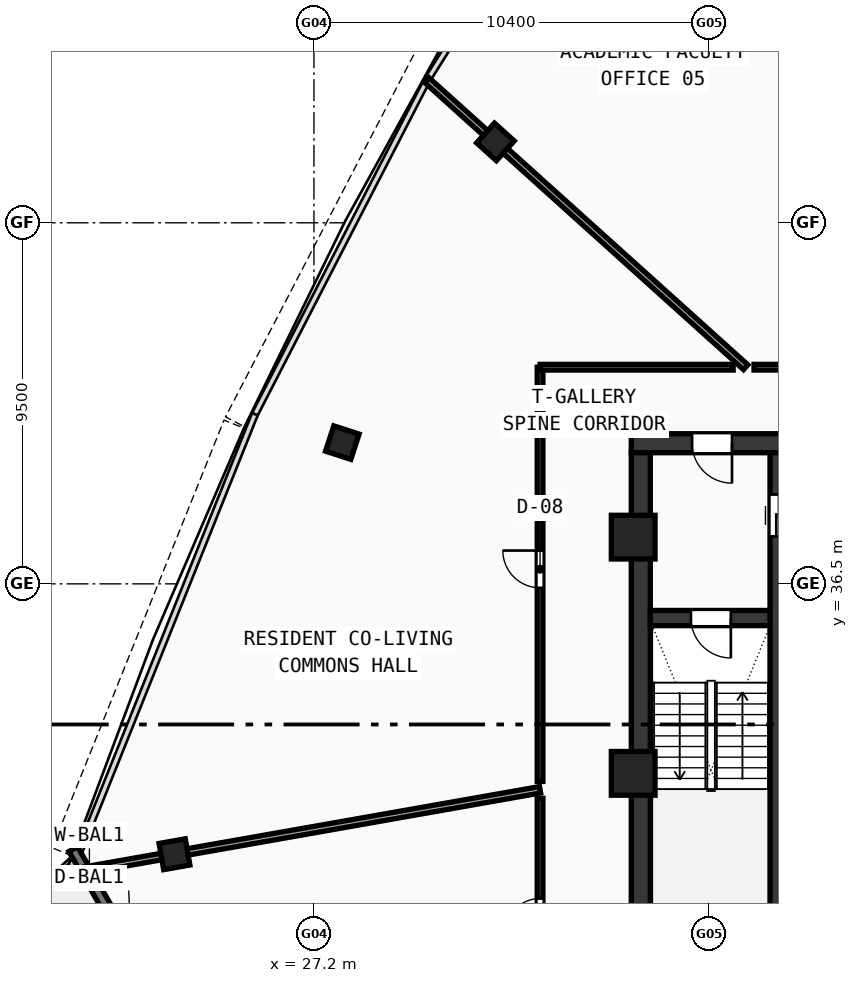
"""IFC4 building model, lengths in metres.
Left out: names, types, materials, properties, quantities, classifications, styles, units other than length and angle.
Written with IfcOpenShell. Run it as: python <this file> out.ifc"""

import sys

from ifc_helpers import new_model, si_unit, direction, frame, frame_2d, origin, origin_with_axes, origin_2d, place, context, subcontext, project, spatial, rectangle, hollow_rectangle, extrude, source, transform, mapped, element, fill, save


model = new_model("IFC4")
c1 = context("Model", 3, precision=1e-05, world=origin(), true_north=direction((0.0, 1.0)))
c2 = subcontext(c1, "Body", "Model", "MODEL_VIEW")
j1 = project(units=[si_unit("LENGTHUNIT", "METRE"), si_unit("PLANEANGLEUNIT", "RADIAN")], contexts=[c1])
p1 = place(None, origin())
s1 = spatial("IfcSite", under=j1, at=p1, CompositionType="ELEMENT")
p2 = place(p1, origin())
s2 = spatial("IfcBuilding", under=s1, at=p2, CompositionType="ELEMENT")
p3 = place(p2, frame((0.0, 0.0, 348.01)))
s3 = spatial("IfcBuildingStorey", under=s2, at=p3, CompositionType="ELEMENT", Elevation=348.01)
p4 = place(p3, frame((35.55, 40.2, 0.0), z_axis=(0.0, 0.0, 1.0), x_axis=(1.0, 0.0, 0.0)))
e1 = element("IfcWall", 1, at=p4, inside=s3, PredefinedType="SHEAR", context=c2, shape_type="SweptSolid", body=[
    extrude(rectangle(XDim=11.25, YDim=0.5, at=frame_2d((5.625, 0.0))), origin(), (0.0, 0.0, 1.0), 3.49),
])
p5 = place(p4, frame((1.6, 0.0, 0.0)))
e2 = element("IfcOpeningElement", 2, at=p5, cuts=e1, PredefinedType="OPENING", context=c2, shape_type="SweptSolid", body=[
    extrude(rectangle(XDim=1.05, YDim=2.1, at=frame_2d((0.525, 1.05))), frame((0.0, 0.26, 0.0), z_axis=(0.0, -1.0, 0.0), x_axis=(1.0, 0.0, 0.0)), (0.0, 0.0, 1.0), 0.52),
])
p6 = place(p3, frame((35.8, 27.75, 0.0), z_axis=(0.0, 0.0, 1.0), x_axis=(0.0, 1.0, 0.0)))
e3 = element("IfcWall", 3, at=p6, inside=s3, PredefinedType="SHEAR", context=c2, shape_type="SweptSolid", body=[
    extrude(rectangle(XDim=12.2, YDim=0.5, at=frame_2d((6.1, 0.0))), origin(), (0.0, 0.0, 1.0), 3.49),
])
p7 = place(p3, frame((39.4, 27.75, 0.0), z_axis=(0.0, 0.0, 1.0), x_axis=(0.0, 1.0, 0.0)))
e4 = element("IfcWall", 4, at=p7, inside=s3, PredefinedType="SHEAR", context=c2, shape_type="SweptSolid", body=[
    extrude(rectangle(XDim=12.2, YDim=0.4, at=frame_2d((6.1, 0.0))), origin(), (0.0, 0.0, 1.0), 3.49),
])
p8 = place(p7, frame((10.0, 0.0, 0.0)))
e5 = element("IfcOpeningElement", 5, at=p8, cuts=e4, PredefinedType="OPENING", context=c2, shape_type="SweptSolid", body=[
    extrude(rectangle(XDim=1.1, YDim=2.1, at=frame_2d((0.55, 1.05))), frame((0.0, 0.21, 0.0), z_axis=(0.0, -1.0, 0.0), x_axis=(1.0, 0.0, 0.0)), (0.0, 0.0, 1.0), 0.42),
])
p9 = place(p3, frame((36.05, 35.6, 0.0), z_axis=(0.0, 0.0, 1.0), x_axis=(1.0, 0.0, 0.0)))
e6 = element("IfcWall", 6, at=p9, inside=s3, PredefinedType="SHEAR", context=c2, shape_type="SweptSolid", body=[
    extrude(rectangle(XDim=3.15, YDim=0.4, at=frame_2d((1.575, 0.0))), origin(), (0.0, 0.0, 1.0), 3.49),
])
p10 = place(p9, frame((1.07, 0.0, 0.0)))
e7 = element("IfcOpeningElement", 7, at=p10, cuts=e6, PredefinedType="OPENING", context=c2, shape_type="SweptSolid", body=[
    extrude(rectangle(XDim=1.05, YDim=2.1, at=frame_2d((0.525, 1.05))), frame((0.0, 0.21, 0.0), z_axis=(0.0, -1.0, 0.0), x_axis=(1.0, 0.0, 0.0)), (0.0, 0.0, 1.0), 0.42),
])
m1 = source(origin(), c2, "Body", "SweptSolid", [
    extrude(hollow_rectangle(XDim=1.15, YDim=1.15, WallThickness=0.048, at=origin_2d()), origin(), (0.0, 0.0, 1.0), 3.75),
])
for number, where, z_axis, x_axis in (
    (8, (35.6, 37.729, -0.26), (0.0, 0.0, 1.0), (1.0, 0.0, 0.0)),
    (9, (35.6, 31.513, -0.26), (0.0, 0.0, 1.0), (1.0, 0.0, 0.0)),
):
    element("IfcColumn", number, at=place(p3, frame(where, z_axis=z_axis, x_axis=x_axis)), inside=s3, PredefinedType="COLUMN", context=c2, shape_type="MappedRepresentation", body=[
        mapped(m1, transform((0.0, 0.0, 0.0), scale=1.0)),
    ])
m2 = source(origin(), c2, "Body", "SweptSolid", [
    extrude(hollow_rectangle(XDim=0.7, YDim=0.7, WallThickness=0.026, at=origin_2d()), origin(), (0.0, 0.0, 1.0), 3.75),
])
for number, where, z_axis, x_axis in (
    (10, (31.975, 48.129, -0.26), (0.0, 0.0, 1.0), (-0.669, -0.743, 0.0)),
    (11, (27.947, 40.216, -0.26), (0.0, 0.0, 1.0), (-0.309, -0.951, 0.0)),
    (12, (23.53, 29.385, -0.26), (0.0, 0.0, 1.0), (0.174, -0.985, 0.0)),
):
    element("IfcColumn", number, at=place(p3, frame(where, z_axis=z_axis, x_axis=x_axis)), inside=s3, PredefinedType="COLUMN", context=c2, shape_type="MappedRepresentation", body=[
        mapped(m2, transform((0.0, 0.0, 0.0), scale=1.0)),
    ])
p11 = place(p3, frame((20.865, 29.521, 0.0), z_axis=(0.0, 0.0, 1.0), x_axis=(0.49795859982, -0.867200803082, 0.0)))
e13 = element("IfcWall", 13, at=p11, inside=s3, PredefinedType="STANDARD", context=c2, shape_type="SweptSolid", body=[
    extrude(rectangle(XDim=6.123, YDim=0.26, at=frame_2d((3.061, 0.0))), origin(), (0.0, 0.0, 1.0), 3.49),
])
p12 = place(p11, frame((2.161, 0.0, 0.0)))
e14 = element("IfcOpeningElement", 14, at=p12, cuts=e13, PredefinedType="OPENING", context=c2, shape_type="SweptSolid", body=[
    extrude(rectangle(XDim=1.8, YDim=2.15, at=frame_2d((0.9, 1.075))), frame((0.0, 0.14, 0.0), z_axis=(0.0, -1.0, 0.0), x_axis=(1.0, 0.0, 0.0)), (0.0, 0.0, 1.0), 0.28),
])
p13 = place(p3, frame((42.702, 45.6, 0.0), z_axis=(0.0, 0.0, 1.0), x_axis=(-0.40675369263, 0.913537866501, 0.0)))
e15 = element("IfcWall", 15, at=p13, inside=s3, PredefinedType="PARTITIONING", context=c2, shape_type="SweptSolid", body=[
    extrude(rectangle(XDim=15.425, YDim=0.17, at=frame_2d((7.712, 0.0))), origin(), (0.0, 0.0, 1.0), 2.89),
])
p14 = place(p3, frame((38.56, 42.2, 0.0), z_axis=(0.0, 0.0, 1.0), x_axis=(-0.74314133574, 0.669134482085, 0.0)))
e16 = element("IfcWall", 16, at=p14, inside=s3, PredefinedType="PARTITIONING", context=c2, shape_type="SweptSolid", body=[
    extrude(rectangle(XDim=11.282, YDim=0.17, at=frame_2d((5.641, 0.0))), origin(), (0.0, 0.0, 1.0), 2.89),
])
p15 = place(p3, frame((33.15, 31.082, 0.0), z_axis=(0.0, 0.0, 1.0), x_axis=(-0.984808019511, -0.173646666272, 0.0)))
e17 = element("IfcWall", 17, at=p15, inside=s3, PredefinedType="PARTITIONING", context=c2, shape_type="SweptSolid", body=[
    extrude(rectangle(XDim=12.153, YDim=0.17, at=frame_2d((6.077, 0.0))), origin(), (0.0, 0.0, 1.0), 2.89),
])
p16 = place(p3, frame((33.15, 24.9, 0.0), z_axis=(0.0, 0.0, 1.0), x_axis=(0.0, 1.0, 0.0)))
e18 = element("IfcWall", 18, at=p16, inside=s3, PredefinedType="PARTITIONING", context=c2, shape_type="SweptSolid", body=[
    extrude(rectangle(XDim=5.958, YDim=0.15, at=frame_2d((2.979, 0.0))), origin(), (0.0, 0.0, 1.0), 2.89),
])
p17 = place(p16, frame((2.401, 0.0, 0.0)))
e19 = element("IfcOpeningElement", 19, at=p17, cuts=e18, PredefinedType="OPENING", context=c2, shape_type="SweptSolid", body=[
    extrude(rectangle(XDim=0.92, YDim=2.1, at=frame_2d((0.46, 1.05))), frame((0.0, 0.085, 0.0), z_axis=(0.0, -1.0, 0.0), x_axis=(1.0, 0.0, 0.0)), (0.0, 0.0, 1.0), 0.17),
])
p18 = place(p3, frame((33.15, 31.301, 0.0), z_axis=(0.0, 0.0, 1.0), x_axis=(0.0, 1.0, 0.0)))
e20 = element("IfcWall", 20, at=p18, inside=s3, PredefinedType="PARTITIONING", context=c2, shape_type="SweptSolid", body=[
    extrude(rectangle(XDim=10.899, YDim=0.15, at=frame_2d((5.449, 0.0))), origin(), (0.0, 0.0, 1.0), 2.89),
])
p19 = place(p18, frame((5.094, 0.0, 0.0)))
e21 = element("IfcOpeningElement", 21, at=p19, cuts=e20, PredefinedType="OPENING", context=c2, shape_type="SweptSolid", body=[
    extrude(rectangle(XDim=0.98, YDim=2.12, at=frame_2d((0.49, 1.06))), frame((0.0, 0.085, 0.0), z_axis=(0.0, -1.0, 0.0), x_axis=(1.0, 0.0, 0.0)), (0.0, 0.0, 1.0), 0.17),
])
p20 = place(p3, frame((33.15, 42.2, 0.0), z_axis=(0.0, 0.0, 1.0), x_axis=(1.0, 0.0, 0.0)))
e22 = element("IfcWall", 22, at=p20, inside=s3, PredefinedType="PARTITIONING", context=c2, shape_type="SweptSolid", body=[
    extrude(rectangle(XDim=5.081, YDim=0.15, at=frame_2d((2.541, 0.0))), origin(), (0.0, 0.0, 1.0), 3.14),
])
p21 = place(p3, frame((38.78, 42.2, 0.0), z_axis=(0.0, 0.0, 1.0), x_axis=(1.0, 0.0, 0.0)))
e23 = element("IfcWall", 23, at=p21, inside=s3, PredefinedType="PARTITIONING", context=c2, shape_type="SweptSolid", body=[
    extrude(rectangle(XDim=3.2, YDim=0.15, at=frame_2d((1.6, 0.0))), origin(), (0.0, 0.0, 1.0), 2.89),
])
p22 = place(p21, frame((1.14, 0.0, 0.0)))
e24 = element("IfcOpeningElement", 24, at=p22, cuts=e23, PredefinedType="OPENING", context=c2, shape_type="SweptSolid", body=[
    extrude(rectangle(XDim=0.92, YDim=2.1, at=frame_2d((0.46, 1.05))), frame((0.0, 0.085, 0.0), z_axis=(0.0, -1.0, 0.0), x_axis=(1.0, 0.0, 0.0)), (0.0, 0.0, 1.0), 0.17),
])
m3 = source(origin(), c2, "Body", "SweptSolid", [
    extrude(rectangle(XDim=1.05, YDim=2.1, at=frame_2d((0.525, 1.05))), frame((0.0, 0.025, 0.0), z_axis=(0.0, -1.0, 0.0), x_axis=(1.0, 0.0, 0.0)), (0.0, 0.0, 1.0), 0.05),
])
p23 = place(p10, frame((1.05, 0.0, 0.0), z_axis=(0.0, 0.0, 1.0), x_axis=(-1.0, 0.0, 0.0)))
e25 = element("IfcDoor", 25, at=p23, inside=s3, OperationType="SINGLE_SWING_LEFT", PredefinedType="DOOR", context=c2, shape_type="MappedRepresentation", body=[
    mapped(m3, transform((0.0, 0.0, 0.0), scale=1.0)),
])
fill(e7, e25)
p24 = place(p5, frame((1.05, 0.0, 0.0), z_axis=(0.0, 0.0, 1.0), x_axis=(-1.0, 0.0, 0.0)))
e26 = element("IfcDoor", 26, at=p24, inside=s3, OperationType="SINGLE_SWING_LEFT", PredefinedType="DOOR", context=c2, shape_type="MappedRepresentation", body=[
    mapped(m3, transform((0.0, 0.0, 0.0), scale=1.0)),
])
fill(e2, e26)
m4 = source(origin(), c2, "Body", "SweptSolid", [
    extrude(rectangle(XDim=1.1, YDim=2.1, at=frame_2d((0.55, 1.05))), frame((0.0, 0.025, 0.0), z_axis=(0.0, -1.0, 0.0), x_axis=(1.0, 0.0, 0.0)), (0.0, 0.0, 1.0), 0.05),
])
p25 = place(p8, frame((1.1, 0.0, 0.0), z_axis=(0.0, 0.0, 1.0), x_axis=(-1.0, 0.0, 0.0)))
e27 = element("IfcDoor", 27, at=p25, inside=s3, OperationType="DOUBLE_DOOR_SLIDING", PredefinedType="DOOR", context=c2, shape_type="MappedRepresentation", body=[
    mapped(m4, transform((0.0, 0.0, 0.0), scale=1.0)),
])
fill(e5, e27)
m5 = source(origin(), c2, "Body", "SweptSolid", [
    extrude(rectangle(XDim=0.98, YDim=2.12, at=frame_2d((0.49, 1.06))), frame((0.0, 0.025, 0.0), z_axis=(0.0, -1.0, 0.0), x_axis=(1.0, 0.0, 0.0)), (0.0, 0.0, 1.0), 0.05),
])
p26 = place(p19, origin_with_axes())
e28 = element("IfcDoor", 28, at=p26, inside=s3, OperationType="SINGLE_SWING_RIGHT", PredefinedType="DOOR", context=c2, shape_type="MappedRepresentation", body=[
    mapped(m5, transform((0.0, 0.0, 0.0), scale=1.0)),
])
fill(e21, e28)
m6 = source(origin(), c2, "Body", "SweptSolid", [
    extrude(rectangle(XDim=0.92, YDim=2.1, at=frame_2d((0.46, 1.05))), frame((0.0, 0.025, 0.0), z_axis=(0.0, -1.0, 0.0), x_axis=(1.0, 0.0, 0.0)), (0.0, 0.0, 1.0), 0.05),
])
p27 = place(p17, origin_with_axes())
e29 = element("IfcDoor", 29, at=p27, inside=s3, OperationType="SINGLE_SWING_LEFT", PredefinedType="DOOR", context=c2, shape_type="MappedRepresentation", body=[
    mapped(m6, transform((0.0, 0.0, 0.0), scale=1.0)),
])
fill(e19, e29)
save(model, sys.argv[1])
